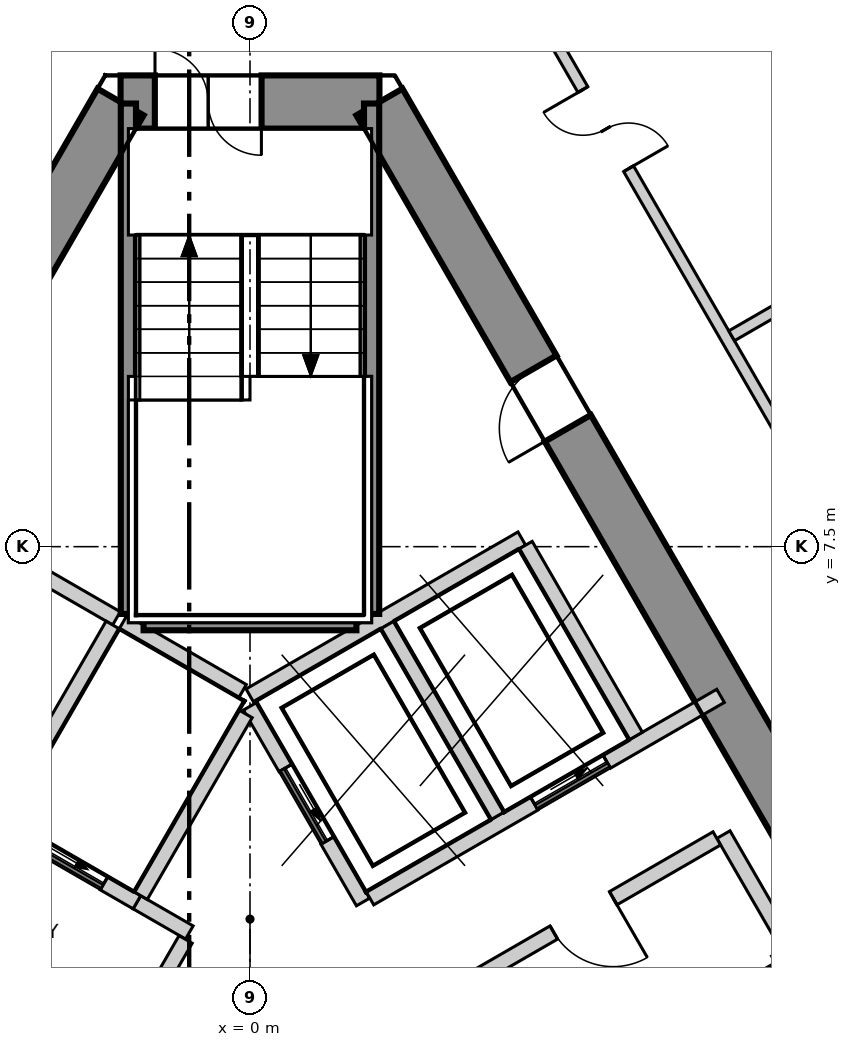
"""IFC4 building model, lengths in metres.
Left out: names, types, materials, properties, quantities, classifications, styles, units other than length and angle.
Written with IfcOpenShell. Run it as: python <this file> out.ifc"""

import sys

from ifc_helpers import new_model, si_unit, direction, frame, frame_2d, origin, place, context, subcontext, project, spatial, polyline, rectangle, outline, extrude, element, fill, save


model = new_model("IFC4")
c1 = context("Model", 3, precision=1e-05, world=origin(), true_north=direction((0.0, 1.0)))
c2 = subcontext(c1, "Body", "Model", "MODEL_VIEW")
j1 = project(units=[si_unit("LENGTHUNIT", "METRE"), si_unit("PLANEANGLEUNIT", "RADIAN")], contexts=[c1])
p1 = place(None, origin())
s1 = spatial("IfcSite", under=j1, at=p1, CompositionType="ELEMENT")
p2 = place(p1, origin())
s2 = spatial("IfcBuilding", under=s1, at=p2, CompositionType="ELEMENT")
p3 = place(p2, frame((0.0, 0.0, 251.3)))
s3 = spatial("IfcBuildingStorey", under=s2, at=p3, CompositionType="ELEMENT", Elevation=251.3)
p4 = place(p3, frame((1.703, 13.35, -0.3), z_axis=(0.0, 0.0, 1.0), x_axis=(-1.0, 0.0, 0.0)))
e1 = element("IfcWall", 1, at=p4, inside=s3, PredefinedType="SHEAR", context=c2, shape_type="SweptSolid", body=[
    extrude(outline(polyline([(-0.202, -0.35), (1.703, -0.35), (3.608, -0.35), (3.204, 0.35), (1.703, 0.35), (0.202, 0.35), (-0.202, -0.35)])), origin(), (0.0, 0.0, 1.0), 4.2),
])
p5 = place(p4, frame((1.553, 0.0, 0.3)))
e2 = element("IfcOpeningElement", 2, at=p5, cuts=e1, PredefinedType="OPENING", context=c2, shape_type="SweptSolid", body=[
    extrude(rectangle(XDim=1.4, YDim=2.1, at=frame_2d((0.7, 1.05))), frame((0.0, 0.36, 0.0), z_axis=(0.0, -1.0, 0.0), x_axis=(1.0, 0.0, 0.0)), (0.0, 0.0, 1.0), 0.72),
])
p6 = place(p3, frame((-1.703, 13.35, -0.3), z_axis=(0.0, 0.0, 1.0), x_axis=(-0.500011533395, -0.866018744874, 0.0)))
e3 = element("IfcWall", 3, at=p6, inside=s3, PredefinedType="SHEAR", context=c2, shape_type="SweptSolid", body=[
    extrude(outline(polyline([(-0.202, -0.35), (1.782, -0.35), (3.766, -0.35), (5.75, -0.35), (7.734, -0.35), (9.718, -0.35), (11.702, -0.35), (13.686, -0.35), (15.67, -0.35), (17.654, -0.35), (19.638, -0.35), (21.622, -0.35), (21.218, 0.35), (19.307, 0.35), (17.397, 0.35), (15.486, 0.35), (13.576, 0.35), (11.665, 0.35), (9.755, 0.35), (7.844, 0.35), (5.934, 0.35), (4.023, 0.35), (2.113, 0.35), (0.202, 0.35), (-0.202, -0.35)])), origin(), (0.0, 0.0, 1.0), 4.2),
])
p7 = place(p6, frame((10.16, 0.0, 0.3)))
e4 = element("IfcOpeningElement", 4, at=p7, cuts=e3, PredefinedType="OPENING", context=c2, shape_type="SweptSolid", body=[
    extrude(rectangle(XDim=1.1, YDim=2.1, at=frame_2d((0.55, 1.05))), frame((0.0, 0.36, 0.0), z_axis=(0.0, -1.0, 0.0), x_axis=(1.0, 0.0, 0.0)), (0.0, 0.0, 1.0), 0.72),
])
p8 = place(p3, frame((12.413, -5.2, -0.3), z_axis=(0.0, 0.0, 1.0), x_axis=(-0.500011533395, 0.866018744874, 0.0)))
e5 = element("IfcWall", 5, at=p8, inside=s3, PredefinedType="SHEAR", context=c2, shape_type="SweptSolid", body=[
    extrude(outline(polyline([(-0.202, -0.35), (1.782, -0.35), (3.766, -0.35), (5.75, -0.35), (7.734, -0.35), (9.718, -0.35), (11.702, -0.35), (13.686, -0.35), (15.67, -0.35), (17.654, -0.35), (19.638, -0.35), (21.622, -0.35), (21.218, 0.35), (19.307, 0.35), (17.397, 0.35), (15.486, 0.35), (13.576, 0.35), (11.665, 0.35), (9.755, 0.35), (7.844, 0.35), (5.934, 0.35), (4.023, 0.35), (2.113, 0.35), (0.202, 0.35), (-0.202, -0.35)])), origin(), (0.0, 0.0, 1.0), 4.2),
])
p9 = place(p8, frame((4.055, 0.0, 0.3)))
e6 = element("IfcOpeningElement", 6, at=p9, cuts=e5, PredefinedType="OPENING", context=c2, shape_type="SweptSolid", body=[
    extrude(rectangle(XDim=0.9, YDim=2.1, at=frame_2d((0.45, 1.05))), frame((0.0, 0.36, 0.0), z_axis=(0.0, -1.0, 0.0), x_axis=(1.0, 0.0, 0.0)), (0.0, 0.0, 1.0), 0.72),
])
p10 = place(p8, frame((16.465, 0.0, 0.3)))
e7 = element("IfcOpeningElement", 7, at=p10, cuts=e5, PredefinedType="OPENING", context=c2, shape_type="SweptSolid", body=[
    extrude(rectangle(XDim=0.9, YDim=2.1, at=frame_2d((0.45, 1.05))), frame((0.0, 0.36, 0.0), z_axis=(0.0, -1.0, 0.0), x_axis=(1.0, 0.0, 0.0)), (0.0, 0.0, 1.0), 0.72),
])
p11 = place(p3, frame((-2.641, 29.489, 0.0), z_axis=(0.0, 0.0, 1.0), x_axis=(-0.500004868955, -0.866022592674, 0.0)))
e8 = element("IfcWall", 8, at=p11, inside=s3, PredefinedType="ELEMENTEDWALL", context=c2, shape_type="SweptSolid", body=[
    extrude(rectangle(XDim=48.416, YDim=0.2, at=frame_2d((24.208, 0.0))), origin(), (0.0, 0.0, 1.0), 3.9),
])
p12 = place(p11, frame((2.067, 0.0, 0.9)))
e9 = element("IfcOpeningElement", 9, at=p12, cuts=e8, PredefinedType="OPENING", context=c2, shape_type="SweptSolid", body=[
    extrude(rectangle(XDim=4.2, YDim=2.5, at=frame_2d((2.1, 1.25))), frame((0.0, 0.11, 0.0), z_axis=(0.0, -1.0, 0.0), x_axis=(1.0, 0.0, 0.0)), (0.0, 0.0, 1.0), 0.22),
])
p13 = place(p11, frame((7.796, 0.0, 0.9)))
e10 = element("IfcOpeningElement", 10, at=p13, cuts=e8, PredefinedType="OPENING", context=c2, shape_type="SweptSolid", body=[
    extrude(rectangle(XDim=4.2, YDim=2.5, at=frame_2d((2.1, 1.25))), frame((0.0, 0.11, 0.0), z_axis=(0.0, -1.0, 0.0), x_axis=(1.0, 0.0, 0.0)), (0.0, 0.0, 1.0), 0.22),
])
p14 = place(p11, frame((13.524, 0.0, 0.9)))
e11 = element("IfcOpeningElement", 11, at=p14, cuts=e8, PredefinedType="OPENING", context=c2, shape_type="SweptSolid", body=[
    extrude(rectangle(XDim=4.2, YDim=2.5, at=frame_2d((2.1, 1.25))), frame((0.0, 0.11, 0.0), z_axis=(0.0, -1.0, 0.0), x_axis=(1.0, 0.0, 0.0)), (0.0, 0.0, 1.0), 0.22),
])
p15 = place(p11, frame((19.253, 0.0, 0.9)))
e12 = element("IfcOpeningElement", 12, at=p15, cuts=e8, PredefinedType="OPENING", context=c2, shape_type="SweptSolid", body=[
    extrude(rectangle(XDim=4.2, YDim=2.5, at=frame_2d((2.1, 1.25))), frame((0.0, 0.11, 0.0), z_axis=(0.0, -1.0, 0.0), x_axis=(1.0, 0.0, 0.0)), (0.0, 0.0, 1.0), 0.22),
])
p16 = place(p11, frame((24.982, 0.0, 0.9)))
e13 = element("IfcOpeningElement", 13, at=p16, cuts=e8, PredefinedType="OPENING", context=c2, shape_type="SweptSolid", body=[
    extrude(rectangle(XDim=4.2, YDim=2.5, at=frame_2d((2.1, 1.25))), frame((0.0, 0.11, 0.0), z_axis=(0.0, -1.0, 0.0), x_axis=(1.0, 0.0, 0.0)), (0.0, 0.0, 1.0), 0.22),
])
p17 = place(p11, frame((30.711, 0.0, 0.9)))
e14 = element("IfcOpeningElement", 14, at=p17, cuts=e8, PredefinedType="OPENING", context=c2, shape_type="SweptSolid", body=[
    extrude(rectangle(XDim=4.2, YDim=2.5, at=frame_2d((2.1, 1.25))), frame((0.0, 0.11, 0.0), z_axis=(0.0, -1.0, 0.0), x_axis=(1.0, 0.0, 0.0)), (0.0, 0.0, 1.0), 0.22),
])
p18 = place(p11, frame((36.439, 0.0, 0.9)))
e15 = element("IfcOpeningElement", 15, at=p18, cuts=e8, PredefinedType="OPENING", context=c2, shape_type="SweptSolid", body=[
    extrude(rectangle(XDim=4.2, YDim=2.5, at=frame_2d((2.1, 1.25))), frame((0.0, 0.11, 0.0), z_axis=(0.0, -1.0, 0.0), x_axis=(1.0, 0.0, 0.0)), (0.0, 0.0, 1.0), 0.22),
])
p19 = place(p11, frame((42.168, 0.0, 0.9)))
e16 = element("IfcOpeningElement", 16, at=p19, cuts=e8, PredefinedType="OPENING", context=c2, shape_type="SweptSolid", body=[
    extrude(rectangle(XDim=4.2, YDim=2.5, at=frame_2d((2.1, 1.25))), frame((0.0, 0.11, 0.0), z_axis=(0.0, -1.0, 0.0), x_axis=(1.0, 0.0, 0.0)), (0.0, 0.0, 1.0), 0.22),
])
p20 = place(p3, frame((26.859, -12.457, 0.0), z_axis=(0.0, 0.0, 1.0), x_axis=(-0.500004868955, 0.866022592674, 0.0)))
e17 = element("IfcWall", 17, at=p20, inside=s3, PredefinedType="ELEMENTEDWALL", context=c2, shape_type="SweptSolid", body=[
    extrude(rectangle(XDim=48.416, YDim=0.2, at=frame_2d((24.208, 0.0))), origin(), (0.0, 0.0, 1.0), 3.9),
])
p21 = place(p20, frame((2.067, 0.0, 0.9)))
e18 = element("IfcOpeningElement", 18, at=p21, cuts=e17, PredefinedType="OPENING", context=c2, shape_type="SweptSolid", body=[
    extrude(rectangle(XDim=4.2, YDim=2.5, at=frame_2d((2.1, 1.25))), frame((0.0, 0.11, 0.0), z_axis=(0.0, -1.0, 0.0), x_axis=(1.0, 0.0, 0.0)), (0.0, 0.0, 1.0), 0.22),
])
p22 = place(p20, frame((7.796, 0.0, 0.9)))
e19 = element("IfcOpeningElement", 19, at=p22, cuts=e17, PredefinedType="OPENING", context=c2, shape_type="SweptSolid", body=[
    extrude(rectangle(XDim=4.2, YDim=2.5, at=frame_2d((2.1, 1.25))), frame((0.0, 0.11, 0.0), z_axis=(0.0, -1.0, 0.0), x_axis=(1.0, 0.0, 0.0)), (0.0, 0.0, 1.0), 0.22),
])
p23 = place(p20, frame((13.525, 0.0, 0.9)))
e20 = element("IfcOpeningElement", 20, at=p23, cuts=e17, PredefinedType="OPENING", context=c2, shape_type="SweptSolid", body=[
    extrude(rectangle(XDim=4.2, YDim=2.5, at=frame_2d((2.1, 1.25))), frame((0.0, 0.11, 0.0), z_axis=(0.0, -1.0, 0.0), x_axis=(1.0, 0.0, 0.0)), (0.0, 0.0, 1.0), 0.22),
])
p24 = place(p20, frame((19.253, 0.0, 0.9)))
e21 = element("IfcOpeningElement", 21, at=p24, cuts=e17, PredefinedType="OPENING", context=c2, shape_type="SweptSolid", body=[
    extrude(rectangle(XDim=4.2, YDim=2.5, at=frame_2d((2.1, 1.25))), frame((0.0, 0.11, 0.0), z_axis=(0.0, -1.0, 0.0), x_axis=(1.0, 0.0, 0.0)), (0.0, 0.0, 1.0), 0.22),
])
p25 = place(p20, frame((24.982, 0.0, 0.9)))
e22 = element("IfcOpeningElement", 22, at=p25, cuts=e17, PredefinedType="OPENING", context=c2, shape_type="SweptSolid", body=[
    extrude(rectangle(XDim=4.2, YDim=2.5, at=frame_2d((2.1, 1.25))), frame((0.0, 0.11, 0.0), z_axis=(0.0, -1.0, 0.0), x_axis=(1.0, 0.0, 0.0)), (0.0, 0.0, 1.0), 0.22),
])
p26 = place(p20, frame((30.711, 0.0, 0.9)))
e23 = element("IfcOpeningElement", 23, at=p26, cuts=e17, PredefinedType="OPENING", context=c2, shape_type="SweptSolid", body=[
    extrude(rectangle(XDim=4.2, YDim=2.5, at=frame_2d((2.1, 1.25))), frame((0.0, 0.11, 0.0), z_axis=(0.0, -1.0, 0.0), x_axis=(1.0, 0.0, 0.0)), (0.0, 0.0, 1.0), 0.22),
])
p27 = place(p20, frame((36.44, 0.0, 0.9)))
e24 = element("IfcOpeningElement", 24, at=p27, cuts=e17, PredefinedType="OPENING", context=c2, shape_type="SweptSolid", body=[
    extrude(rectangle(XDim=4.2, YDim=2.5, at=frame_2d((2.1, 1.25))), frame((0.0, 0.11, 0.0), z_axis=(0.0, -1.0, 0.0), x_axis=(1.0, 0.0, 0.0)), (0.0, 0.0, 1.0), 0.22),
])
p28 = place(p20, frame((42.168, 0.0, 0.9)))
e25 = element("IfcOpeningElement", 25, at=p28, cuts=e17, PredefinedType="OPENING", context=c2, shape_type="SweptSolid", body=[
    extrude(rectangle(XDim=4.2, YDim=2.5, at=frame_2d((2.1, 1.25))), frame((0.0, 0.11, 0.0), z_axis=(0.0, -1.0, 0.0), x_axis=(1.0, 0.0, 0.0)), (0.0, 0.0, 1.0), 0.22),
])
p29 = place(p3, frame((3.132, 15.675, 0.0), z_axis=(0.0, 0.0, 1.0), x_axis=(0.499994246357, -0.866028725626, 0.0)))
e26 = element("IfcWall", 26, at=p29, inside=s3, PredefinedType="PARTITIONING", context=c2, shape_type="SweptSolid", body=[
    extrude(rectangle(XDim=24.104, YDim=0.15, at=frame_2d((12.052, 0.0))), origin(), (0.0, 0.0, 1.0), 3.9),
])
p30 = place(p29, frame((20.321, 0.0, 0.0)))
e27 = element("IfcOpeningElement", 27, at=p30, cuts=e26, PredefinedType="OPENING", context=c2, shape_type="SweptSolid", body=[
    extrude(rectangle(XDim=1.2, YDim=2.1, at=frame_2d((0.6, 1.05))), frame((0.0, 0.085, 0.0), z_axis=(0.0, -1.0, 0.0), x_axis=(1.0, 0.0, 0.0)), (0.0, 0.0, 1.0), 0.17),
])
p31 = place(p29, frame((11.508, 0.0, 0.0)))
e28 = element("IfcOpeningElement", 28, at=p31, cuts=e26, PredefinedType="OPENING", context=c2, shape_type="SweptSolid", body=[
    extrude(rectangle(XDim=1.0, YDim=2.1, at=frame_2d((0.5, 1.05))), frame((0.0, 0.085, 0.0), z_axis=(0.0, -1.0, 0.0), x_axis=(1.0, 0.0, 0.0)), (0.0, 0.0, 1.0), 0.17),
])
p32 = place(p29, frame((2.497, 0.0, 0.0)))
e29 = element("IfcOpeningElement", 29, at=p32, cuts=e26, PredefinedType="OPENING", context=c2, shape_type="SweptSolid", body=[
    extrude(rectangle(XDim=1.2, YDim=2.1, at=frame_2d((0.6, 1.05))), frame((0.0, 0.085, 0.0), z_axis=(0.0, -1.0, 0.0), x_axis=(1.0, 0.0, 0.0)), (0.0, 0.0, 1.0), 0.17),
])
p33 = place(p3, frame((6.337, 10.274, 0.0), z_axis=(0.0, 0.0, 1.0), x_axis=(0.866030104553, 0.499991857942, 0.0)))
e30 = element("IfcWall", 30, at=p33, inside=s3, PredefinedType="PARTITIONING", context=c2, shape_type="SweptSolid", body=[
    extrude(rectangle(XDim=6.406, YDim=0.15, at=frame_2d((3.203, 0.0))), origin(), (0.0, 0.0, 1.0), 3.9),
])
p34 = place(p3, frame((-0.002, 5.541, 0.0), z_axis=(0.0, 0.0, 1.0), x_axis=(0.86600155993, 0.500041296494, 0.0)))
e31 = element("IfcWall", 31, at=p34, inside=s3, PredefinedType="SOLIDWALL", context=c2, shape_type="SweptSolid", body=[
    extrude(rectangle(XDim=4.132, YDim=0.2, at=frame_2d((2.066, 0.0))), origin(), (0.0, 0.0, 1.0), 3.9),
])
p35 = place(p3, frame((0.0, 5.4, 0.0), z_axis=(0.0, 0.0, 1.0), x_axis=(0.500103862429, -0.865965430478, 0.0)))
e32 = element("IfcWall", 32, at=p35, inside=s3, PredefinedType="SOLIDWALL", context=c2, shape_type="SweptSolid", body=[
    extrude(rectangle(XDim=2.973, YDim=0.2, at=frame_2d((1.487, 0.0))), origin(), (0.0, 0.0, 1.0), 3.9),
])
p36 = place(p35, frame((0.937, 0.0, 0.0)))
e33 = element("IfcOpeningElement", 33, at=p36, cuts=e32, PredefinedType="OPENING", context=c2, shape_type="SweptSolid", body=[
    extrude(rectangle(XDim=1.1, YDim=2.1, at=frame_2d((0.55, 1.05))), frame((0.0, 0.11, 0.0), z_axis=(0.0, -1.0, 0.0), x_axis=(1.0, 0.0, 0.0)), (0.0, 0.0, 1.0), 0.22),
])
p37 = place(p3, frame((1.578, 2.874, 0.0), z_axis=(0.0, 0.0, 1.0), x_axis=(0.866045911672, 0.499964477614, 0.0)))
e34 = element("IfcWall", 34, at=p37, inside=s3, PredefinedType="SOLIDWALL", context=c2, shape_type="SweptSolid", body=[
    extrude(rectangle(XDim=5.327, YDim=0.2, at=frame_2d((2.663, 0.0))), origin(), (0.0, 0.0, 1.0), 3.9),
])
p38 = place(p37, frame((2.496, 0.0, 0.0)))
e35 = element("IfcOpeningElement", 35, at=p38, cuts=e34, PredefinedType="OPENING", context=c2, shape_type="SweptSolid", body=[
    extrude(rectangle(XDim=1.1, YDim=2.1, at=frame_2d((0.55, 1.05))), frame((0.0, 0.11, 0.0), z_axis=(0.0, -1.0, 0.0), x_axis=(1.0, 0.0, 0.0)), (0.0, 0.0, 1.0), 0.22),
])
for number, where, z_axis, x_axis in (
    (36, (3.626, 7.52, 0.0), (0.0, 0.0, 1.0), (0.5, -0.866, 0.0)),
    (37, (1.807, 6.47, 0.0), (0.0, 0.0, 1.0), (0.5, -0.866, 0.0)),
):
    element("IfcWall", number, at=place(p3, frame(where, z_axis=z_axis, x_axis=x_axis)), inside=s3, PredefinedType="SOLIDWALL", context=c2, shape_type="SweptSolid", body=[
        extrude(rectangle(XDim=2.9, YDim=0.2, at=frame_2d((1.45, 0.0))), origin(), (0.0, 0.0, 1.0), 3.9),
    ])
p39 = place(p3, frame((6.229, 3.712, 0.0), z_axis=(0.0, 0.0, 1.0), x_axis=(0.499875724984, -0.86609714211, 0.0)))
e38 = element("IfcWall", 38, at=p39, inside=s3, PredefinedType="SOLIDWALL", context=c2, shape_type="SweptSolid", body=[
    extrude(rectangle(XDim=1.701, YDim=0.2, at=frame_2d((0.85, 0.0))), origin(), (0.0, 0.0, 1.0), 3.9),
])
p40 = place(p3, frame((2.548, 1.587, 0.0), z_axis=(0.0, 0.0, 1.0), x_axis=(0.866004344652, 0.500036473714, 0.0)))
e39 = element("IfcWall", 39, at=p40, inside=s3, PredefinedType="SOLIDWALL", context=c2, shape_type="SweptSolid", body=[
    extrude(rectangle(XDim=4.15, YDim=0.2, at=frame_2d((2.075, 0.0))), origin(), (0.0, 0.0, 1.0), 3.9),
])
p41 = place(p40, frame((1.675, 0.0, 0.0)))
e40 = element("IfcOpeningElement", 40, at=p41, cuts=e39, PredefinedType="OPENING", context=c2, shape_type="SweptSolid", body=[
    extrude(rectangle(XDim=0.9, YDim=2.1, at=frame_2d((0.45, 1.05))), frame((0.0, 0.11, 0.0), z_axis=(0.0, -1.0, 0.0), x_axis=(1.0, 0.0, 0.0)), (0.0, 0.0, 1.0), 0.22),
])
p42 = place(p3, frame((-1.488, 2.822, 0.0), z_axis=(0.0, 0.0, 1.0), x_axis=(0.866236612152, -0.499633997809, 0.0)))
e41 = element("IfcWall", 41, at=p42, inside=s3, PredefinedType="SOLIDWALL", context=c2, shape_type="SweptSolid", body=[
    extrude(rectangle(XDim=0.796, YDim=0.2, at=frame_2d((0.398, 0.0))), origin(), (0.0, 0.0, 1.0), 3.9),
])
p43 = place(p3, frame((-3.489, 7.557, 0.0), z_axis=(0.0, 0.0, 1.0), x_axis=(0.866010750942, -0.50002537861, 0.0)))
e42 = element("IfcWall", 42, at=p43, inside=s3, PredefinedType="SOLIDWALL", context=c2, shape_type="SweptSolid", body=[
    extrude(rectangle(XDim=2.0, YDim=0.2, at=frame_2d((1.0, 0.0))), origin(), (0.0, 0.0, 1.0), 3.9),
])
p44 = place(p3, frame((-2.444, -0.433, 0.0), z_axis=(0.0, 0.0, 1.0), x_axis=(0.500035624827, 0.866004834804, 0.0)))
e43 = element("IfcWall", 43, at=p44, inside=s3, PredefinedType="SOLIDWALL", context=c2, shape_type="SweptSolid", body=[
    extrude(rectangle(XDim=3.194, YDim=0.2, at=frame_2d((1.597, 0.0))), origin(), (0.0, 0.0, 1.0), 3.9),
])
p45 = place(p3, frame((-3.309, 3.873, 0.0), z_axis=(0.0, 0.0, 1.0), x_axis=(0.866098583652, -0.499873227325, 0.0)))
e44 = element("IfcWall", 44, at=p45, inside=s3, PredefinedType="SOLIDWALL", context=c2, shape_type="SweptSolid", body=[
    extrude(rectangle(XDim=2.103, YDim=0.2, at=frame_2d((1.051, 0.0))), origin(), (0.0, 0.0, 1.0), 3.9),
])
p46 = place(p45, frame((0.502, 0.0, 0.0)))
e45 = element("IfcOpeningElement", 45, at=p46, cuts=e44, PredefinedType="OPENING", context=c2, shape_type="SweptSolid", body=[
    extrude(rectangle(XDim=1.1, YDim=2.1, at=frame_2d((0.55, 1.05))), frame((0.0, 0.11, 0.0), z_axis=(0.0, -1.0, 0.0), x_axis=(1.0, 0.0, 0.0)), (0.0, 0.0, 1.0), 0.22),
])
p47 = place(p3, frame((-3.257, 3.959, 0.0), z_axis=(0.0, 0.0, 1.0), x_axis=(0.50012328804, 0.865954211699, 0.0)))
e46 = element("IfcWall", 46, at=p47, inside=s3, PredefinedType="SOLIDWALL", context=c2, shape_type="SweptSolid", body=[
    extrude(rectangle(XDim=2.9, YDim=0.2, at=frame_2d((1.45, 0.0))), origin(), (0.0, 0.0, 1.0), 3.9),
])
p48 = place(p3, frame((-1.67, 6.507, 0.0), z_axis=(0.0, 0.0, 1.0), x_axis=(0.865941441609, -0.500145398563, 0.0)))
e47 = element("IfcWall", 47, at=p48, inside=s3, PredefinedType="SOLIDWALL", context=c2, shape_type="SweptSolid", body=[
    extrude(rectangle(XDim=1.815, YDim=0.2, at=frame_2d((0.908, 0.0))), origin(), (0.0, 0.0, 1.0), 3.9),
])
p49 = place(p3, frame((-1.438, 2.909, 0.0), z_axis=(0.0, 0.0, 1.0), x_axis=(0.499829630636, 0.866123744241, 0.0)))
e48 = element("IfcWall", 48, at=p49, inside=s3, PredefinedType="SOLIDWALL", context=c2, shape_type="SweptSolid", body=[
    extrude(rectangle(XDim=2.761, YDim=0.2, at=frame_2d((1.38, 0.0))), origin(), (0.0, 0.0, 1.0), 3.9),
])
p50 = place(p3, frame((6.826, 1.978, 0.0), z_axis=(0.0, 0.0, 1.0), x_axis=(0.499990139034, -0.866031096941, 0.0)))
e49 = element("IfcWall", 49, at=p50, inside=s3, PredefinedType="SOLIDWALL", context=c2, shape_type="SweptSolid", body=[
    extrude(rectangle(XDim=3.0, YDim=0.2, at=frame_2d((1.5, 0.0))), origin(), (0.0, 0.0, 1.0), 3.9),
])
p51 = place(p3, frame((1.6, 6.615, 0.0), z_axis=(0.0, 0.0, 1.0), x_axis=(0.0, 1.0, 0.0)))
e50 = element("IfcWall", 50, at=p51, inside=s3, PredefinedType="SOLIDWALL", context=c2, shape_type="SweptSolid", body=[
    extrude(rectangle(XDim=6.715, YDim=0.2, at=frame_2d((3.357, 0.0))), origin(), (0.0, 0.0, 1.0), 3.9),
])
p52 = place(p3, frame((-1.4, 6.5, 0.0), z_axis=(0.0, 0.0, 1.0), x_axis=(1.0, 0.0, 0.0)))
e51 = element("IfcWall", 51, at=p52, inside=s3, PredefinedType="SOLIDWALL", context=c2, shape_type="SweptSolid", body=[
    extrude(rectangle(XDim=2.8, YDim=0.2, at=frame_2d((1.4, 0.0))), origin(), (0.0, 0.0, 1.0), 3.9),
])
p53 = place(p3, frame((-1.6, 6.615, 0.0), z_axis=(0.0, 0.0, 1.0), x_axis=(0.0, 1.0, 0.0)))
e52 = element("IfcWall", 52, at=p53, inside=s3, PredefinedType="SOLIDWALL", context=c2, shape_type="SweptSolid", body=[
    extrude(rectangle(XDim=6.715, YDim=0.2, at=frame_2d((3.357, 0.0))), origin(), (0.0, 0.0, 1.0), 3.9),
])
p54 = place(p36, origin())
e53 = element("IfcDoor", 53, at=p54, inside=s3, OperationType="SLIDING_TO_LEFT", PredefinedType="DOOR", context=c2, shape_type="SweptSolid", body=[
    extrude(rectangle(XDim=1.1, YDim=2.1, at=frame_2d((0.55, 1.05))), frame((0.0, 0.025, 0.0), z_axis=(0.0, -1.0, 0.0), x_axis=(1.0, 0.0, 0.0)), (0.0, 0.0, 1.0), 0.05),
])
fill(e33, e53)
p55 = place(p38, origin())
e54 = element("IfcDoor", 54, at=p55, inside=s3, OperationType="SLIDING_TO_LEFT", PredefinedType="DOOR", context=c2, shape_type="SweptSolid", body=[
    extrude(rectangle(XDim=1.1, YDim=2.1, at=frame_2d((0.55, 1.05))), frame((0.0, 0.025, 0.0), z_axis=(0.0, -1.0, 0.0), x_axis=(1.0, 0.0, 0.0)), (0.0, 0.0, 1.0), 0.05),
])
fill(e35, e54)
p56 = place(p46, origin())
e55 = element("IfcDoor", 55, at=p56, inside=s3, OperationType="SLIDING_TO_LEFT", PredefinedType="DOOR", context=c2, shape_type="SweptSolid", body=[
    extrude(rectangle(XDim=1.1, YDim=2.1, at=frame_2d((0.55, 1.05))), frame((0.0, 0.025, 0.0), z_axis=(0.0, -1.0, 0.0), x_axis=(1.0, 0.0, 0.0)), (0.0, 0.0, 1.0), 0.05),
])
fill(e45, e55)
p57 = place(p32, origin())
e56 = element("IfcDoor", 56, at=p57, inside=s3, OperationType="DOUBLE_DOOR_SINGLE_SWING", PredefinedType="DOOR", context=c2, shape_type="SweptSolid", body=[
    extrude(rectangle(XDim=1.2, YDim=2.1, at=frame_2d((0.6, 1.05))), frame((0.0, 0.025, 0.0), z_axis=(0.0, -1.0, 0.0), x_axis=(1.0, 0.0, 0.0)), (0.0, 0.0, 1.0), 0.05),
])
fill(e29, e56)
p58 = place(p5, origin())
e57 = element("IfcDoor", 57, at=p58, inside=s3, OperationType="DOUBLE_DOOR_SINGLE_SWING", PredefinedType="DOOR", context=c2, shape_type="SweptSolid", body=[
    extrude(rectangle(XDim=1.4, YDim=2.1, at=frame_2d((0.7, 1.05))), frame((0.0, 0.025, 0.0), z_axis=(0.0, -1.0, 0.0), x_axis=(1.0, 0.0, 0.0)), (0.0, 0.0, 1.0), 0.05),
])
fill(e2, e57)
p59 = place(p10, origin())
e58 = element("IfcDoor", 58, at=p59, inside=s3, OperationType="SINGLE_SWING_RIGHT", PredefinedType="DOOR", context=c2, shape_type="SweptSolid", body=[
    extrude(rectangle(XDim=0.9, YDim=2.1, at=frame_2d((0.45, 1.05))), frame((0.0, 0.025, 0.0), z_axis=(0.0, -1.0, 0.0), x_axis=(1.0, 0.0, 0.0)), (0.0, 0.0, 1.0), 0.05),
])
fill(e7, e58)
p60 = place(p41, origin())
e59 = element("IfcDoor", 59, at=p60, inside=s3, OperationType="SINGLE_SWING_RIGHT", PredefinedType="DOOR", context=c2, shape_type="SweptSolid", body=[
    extrude(rectangle(XDim=0.9, YDim=2.1, at=frame_2d((0.45, 1.05))), frame((0.0, 0.025, 0.0), z_axis=(0.0, -1.0, 0.0), x_axis=(1.0, 0.0, 0.0)), (0.0, 0.0, 1.0), 0.05),
])
fill(e40, e59)
save(model, sys.argv[1])
